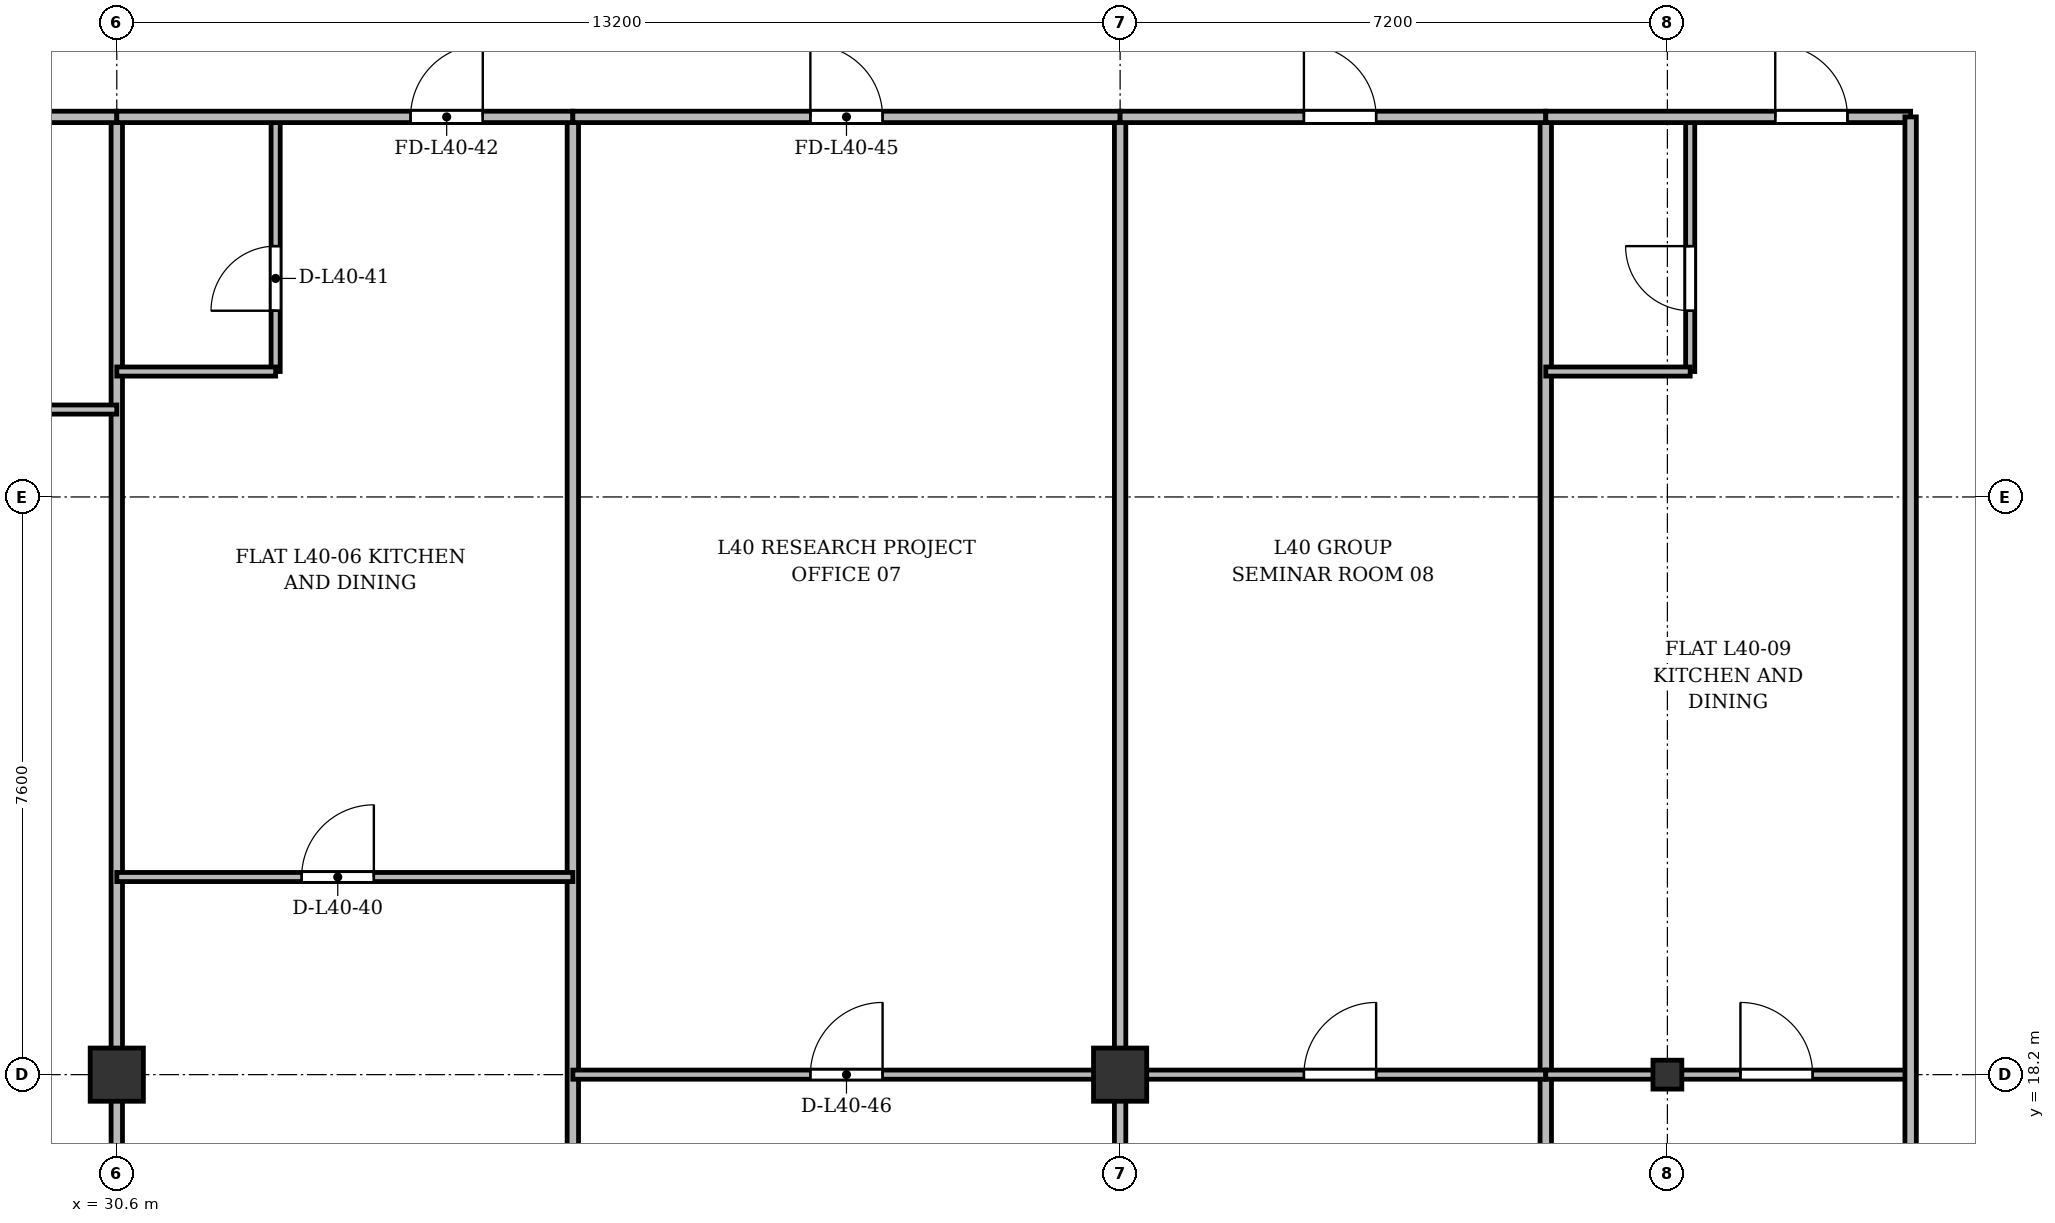
"""IFC4 building model, lengths in metres.
Left out: names, types, materials, properties, quantities, classifications, styles, units other than length and angle.
Written with IfcOpenShell. Run it as: python <this file> out.ifc"""

import sys

from ifc_helpers import new_model, si_unit, direction, frame, frame_2d, origin, origin_2d, place, context, subcontext, project, spatial, rectangle, i_section, extrude, source, transform, mapped, element, fill, save


model = new_model("IFC4")
c1 = context("Model", 3, precision=1e-05, world=origin(), true_north=direction((0.0, 1.0)))
c2 = subcontext(c1, "Body", "Model", "MODEL_VIEW")
j1 = project(units=[si_unit("LENGTHUNIT", "METRE"), si_unit("PLANEANGLEUNIT", "RADIAN")], contexts=[c1])
p1 = place(None, origin())
s1 = spatial("IfcSite", under=j1, at=p1, CompositionType="ELEMENT")
p2 = place(p1, origin())
s2 = spatial("IfcBuilding", under=s1, at=p2, CompositionType="ELEMENT")
p3 = place(p2, frame((0.0, 0.0, 153.7)))
s3 = spatial("IfcBuildingStorey", under=s2, at=p3, CompositionType="ELEMENT", Elevation=153.7)
m1 = source(origin(), c2, "Body", "SweptSolid", [
    extrude(rectangle(XDim=0.7, YDim=0.7, at=origin_2d()), origin(), (0.0, 0.0, 1.0), 3.6),
])
for number, where, z_axis, x_axis in (
    (1, (30.6, 18.2, 0.0), (0.0, 0.0, 1.0), (1.0, 0.0, 0.0)),
    (2, (43.8, 18.2, 0.0), (0.0, 0.0, 1.0), (1.0, 0.0, 0.0)),
):
    element("IfcColumn", number, at=place(p3, frame(where, z_axis=z_axis, x_axis=x_axis)), inside=s3, PredefinedType="COLUMN", context=c2, shape_type="MappedRepresentation", body=[
        mapped(m1, transform((0.0, 0.0, 0.0), x_axis=(1.0, 0.0, 0.0), y_axis=(0.0, 1.0, 0.0), z_axis=(0.0, 0.0, 1.0), scale=1.0)),
    ])
m2 = source(origin(), c2, "Body", "SweptSolid", [
    extrude(i_section(OverallWidth=0.38, OverallDepth=0.38, WebThickness=0.02, FlangeThickness=0.03, at=origin_2d()), origin(), (0.0, 0.0, 1.0), 3.6),
])
p4 = place(p3, frame((51.0, 18.2, 0.0), z_axis=(0.0, 0.0, 1.0), x_axis=(1.0, 0.0, 0.0)))
e3 = element("IfcColumn", 3, at=p4, inside=s3, PredefinedType="COLUMN", context=c2, shape_type="MappedRepresentation", body=[
    mapped(m2, transform((0.0, 0.0, 0.0), x_axis=(1.0, 0.0, 0.0), y_axis=(0.0, 1.0, 0.0), z_axis=(0.0, 0.0, 1.0), scale=1.0)),
])
p5 = place(p3, frame((30.6, 3.525, 0.0), z_axis=(0.0, 0.0, 1.0), x_axis=(0.0, 1.0, 0.0)))
e4 = element("IfcWall", 4, at=p5, inside=s3, PredefinedType="PARTITIONING", context=c2, shape_type="SweptSolid", body=[
    extrude(rectangle(XDim=27.275, YDim=0.15, at=frame_2d((13.638, 0.0))), origin(), (0.0, 0.0, 1.0), 2.85),
])
p6 = place(p3, frame((36.6, 3.525, 0.0), z_axis=(0.0, 0.0, 1.0), x_axis=(0.0, 1.0, 0.0)))
e5 = element("IfcWall", 5, at=p6, inside=s3, PredefinedType="PARTITIONING", context=c2, shape_type="SweptSolid", body=[
    extrude(rectangle(XDim=27.275, YDim=0.15, at=frame_2d((13.638, 0.0))), origin(), (0.0, 0.0, 1.0), 2.75),
])
p7 = place(p3, frame((43.8, 3.525, 0.0), z_axis=(0.0, 0.0, 1.0), x_axis=(0.0, 1.0, 0.0)))
e6 = element("IfcWall", 6, at=p7, inside=s3, PredefinedType="PARTITIONING", context=c2, shape_type="SweptSolid", body=[
    extrude(rectangle(XDim=27.275, YDim=0.15, at=frame_2d((13.638, 0.0))), origin(), (0.0, 0.0, 1.0), 2.85),
])
p8 = place(p3, frame((49.4, 3.525, 0.0), z_axis=(0.0, 0.0, 1.0), x_axis=(0.0, 1.0, 0.0)))
e7 = element("IfcWall", 7, at=p8, inside=s3, PredefinedType="PARTITIONING", context=c2, shape_type="SweptSolid", body=[
    extrude(rectangle(XDim=27.275, YDim=0.15, at=frame_2d((13.638, 0.0))), origin(), (0.0, 0.0, 1.0), 2.75),
])
p9 = place(p3, frame((26.2, 30.8, 0.0), z_axis=(0.0, 0.0, 1.0), x_axis=(1.0, 0.0, 0.0)))
e8 = element("IfcWall", 8, at=p9, inside=s3, PredefinedType="PARTITIONING", context=c2, shape_type="SweptSolid", body=[
    extrude(rectangle(XDim=4.4, YDim=0.15, at=frame_2d((2.2, 0.0))), origin(), (0.0, 0.0, 1.0), 2.85),
])
p10 = place(p9, frame((1.725, 0.0, 0.0)))
e9 = element("IfcOpeningElement", 9, at=p10, cuts=e8, PredefinedType="OPENING", context=c2, shape_type="SweptSolid", body=[
    extrude(rectangle(XDim=0.95, YDim=2.15, at=frame_2d((0.475, 1.075))), frame((0.0, 0.085, 0.0), z_axis=(0.0, -1.0, 0.0), x_axis=(1.0, 0.0, 0.0)), (0.0, 0.0, 1.0), 0.17),
])
p11 = place(p3, frame((26.2, 26.95, 0.0), z_axis=(0.0, 0.0, 1.0), x_axis=(1.0, 0.0, 0.0)))
e10 = element("IfcWall", 10, at=p11, inside=s3, PredefinedType="PARTITIONING", context=c2, shape_type="SweptSolid", body=[
    extrude(rectangle(XDim=4.4, YDim=0.12, at=frame_2d((2.2, 0.0))), origin(), (0.0, 0.0, 1.0), 2.85),
])
p12 = place(p11, frame((1.725, 0.0, 0.0)))
e11 = element("IfcOpeningElement", 11, at=p12, cuts=e10, PredefinedType="OPENING", context=c2, shape_type="SweptSolid", body=[
    extrude(rectangle(XDim=0.95, YDim=2.15, at=frame_2d((0.475, 1.075))), frame((0.0, 0.07, 0.0), z_axis=(0.0, -1.0, 0.0), x_axis=(1.0, 0.0, 0.0)), (0.0, 0.0, 1.0), 0.14),
])
p13 = place(p3, frame((30.6, 20.8, 0.0), z_axis=(0.0, 0.0, 1.0), x_axis=(1.0, 0.0, 0.0)))
e12 = element("IfcWall", 12, at=p13, inside=s3, PredefinedType="PARTITIONING", context=c2, shape_type="SweptSolid", body=[
    extrude(rectangle(XDim=6.0, YDim=0.12, at=frame_2d((3.0, 0.0))), origin(), (0.0, 0.0, 1.0), 2.85),
])
p14 = place(p13, frame((2.432, 0.0, 0.0)))
e13 = element("IfcOpeningElement", 13, at=p14, cuts=e12, PredefinedType="OPENING", context=c2, shape_type="SweptSolid", body=[
    extrude(rectangle(XDim=0.95, YDim=2.15, at=frame_2d((0.475, 1.075))), frame((0.0, 0.07, 0.0), z_axis=(0.0, -1.0, 0.0), x_axis=(1.0, 0.0, 0.0)), (0.0, 0.0, 1.0), 0.14),
])
p15 = place(p3, frame((32.69, 27.45, 0.0), z_axis=(0.0, 0.0, 1.0), x_axis=(0.0, 1.0, 0.0)))
e14 = element("IfcWall", 14, at=p15, inside=s3, PredefinedType="PARTITIONING", context=c2, shape_type="SweptSolid", body=[
    extrude(rectangle(XDim=3.35, YDim=0.12, at=frame_2d((1.675, 0.0))), origin(), (0.0, 0.0, 1.0), 3.35),
])
p16 = place(p15, frame((0.8, 0.0, 0.0)))
e15 = element("IfcOpeningElement", 15, at=p16, cuts=e14, PredefinedType="OPENING", context=c2, shape_type="SweptSolid", body=[
    extrude(rectangle(XDim=0.85, YDim=2.1, at=frame_2d((0.425, 1.05))), frame((0.0, 0.07, 0.0), z_axis=(0.0, -1.0, 0.0), x_axis=(1.0, 0.0, 0.0)), (0.0, 0.0, 1.0), 0.14),
])
p17 = place(p3, frame((30.6, 27.45, 0.0), z_axis=(0.0, 0.0, 1.0), x_axis=(1.0, 0.0, 0.0)))
e16 = element("IfcWall", 16, at=p17, inside=s3, PredefinedType="PARTITIONING", context=c2, shape_type="SweptSolid", body=[
    extrude(rectangle(XDim=2.09, YDim=0.12, at=frame_2d((1.045, 0.0))), origin(), (0.0, 0.0, 1.0), 2.85),
])
p18 = place(p3, frame((30.6, 30.8, 0.0), z_axis=(0.0, 0.0, 1.0), x_axis=(1.0, 0.0, 0.0)))
e17 = element("IfcWall", 17, at=p18, inside=s3, PredefinedType="PARTITIONING", context=c2, shape_type="SweptSolid", body=[
    extrude(rectangle(XDim=6.0, YDim=0.15, at=frame_2d((3.0, 0.0))), origin(), (0.0, 0.0, 1.0), 2.85),
])
p19 = place(p18, frame((3.865, 0.0, 0.0)))
e18 = element("IfcOpeningElement", 18, at=p19, cuts=e17, PredefinedType="OPENING", context=c2, shape_type="SweptSolid", body=[
    extrude(rectangle(XDim=0.95, YDim=2.15, at=frame_2d((0.475, 1.075))), frame((0.0, 0.085, 0.0), z_axis=(0.0, -1.0, 0.0), x_axis=(1.0, 0.0, 0.0)), (0.0, 0.0, 1.0), 0.17),
])
p20 = place(p3, frame((36.6, 30.8, 0.0), z_axis=(0.0, 0.0, 1.0), x_axis=(1.0, 0.0, 0.0)))
e19 = element("IfcWall", 19, at=p20, inside=s3, PredefinedType="PARTITIONING", context=c2, shape_type="SweptSolid", body=[
    extrude(rectangle(XDim=7.2, YDim=0.15, at=frame_2d((3.6, 0.0))), origin(), (0.0, 0.0, 1.0), 2.85),
])
p21 = place(p20, frame((3.125, 0.0, 0.0)))
e20 = element("IfcOpeningElement", 20, at=p21, cuts=e19, PredefinedType="OPENING", context=c2, shape_type="SweptSolid", body=[
    extrude(rectangle(XDim=0.95, YDim=2.15, at=frame_2d((0.475, 1.075))), frame((0.0, 0.085, 0.0), z_axis=(0.0, -1.0, 0.0), x_axis=(1.0, 0.0, 0.0)), (0.0, 0.0, 1.0), 0.17),
])
p22 = place(p3, frame((36.6, 18.2, 0.0), z_axis=(0.0, 0.0, 1.0), x_axis=(1.0, 0.0, 0.0)))
e21 = element("IfcWall", 21, at=p22, inside=s3, PredefinedType="PARTITIONING", context=c2, shape_type="SweptSolid", body=[
    extrude(rectangle(XDim=7.2, YDim=0.12, at=frame_2d((3.6, 0.0))), origin(), (0.0, 0.0, 1.0), 2.75),
])
p23 = place(p22, frame((3.125, 0.0, 0.0)))
e22 = element("IfcOpeningElement", 22, at=p23, cuts=e21, PredefinedType="OPENING", context=c2, shape_type="SweptSolid", body=[
    extrude(rectangle(XDim=0.95, YDim=2.15, at=frame_2d((0.475, 1.075))), frame((0.0, 0.07, 0.0), z_axis=(0.0, -1.0, 0.0), x_axis=(1.0, 0.0, 0.0)), (0.0, 0.0, 1.0), 0.14),
])
p24 = place(p3, frame((43.8, 30.8, 0.0), z_axis=(0.0, 0.0, 1.0), x_axis=(1.0, 0.0, 0.0)))
e23 = element("IfcWall", 23, at=p24, inside=s3, PredefinedType="PARTITIONING", context=c2, shape_type="SweptSolid", body=[
    extrude(rectangle(XDim=5.6, YDim=0.15, at=frame_2d((2.8, 0.0))), origin(), (0.0, 0.0, 1.0), 2.85),
])
p25 = place(p24, frame((2.418, 0.0, 0.0)))
e24 = element("IfcOpeningElement", 24, at=p25, cuts=e23, PredefinedType="OPENING", context=c2, shape_type="SweptSolid", body=[
    extrude(rectangle(XDim=0.95, YDim=2.15, at=frame_2d((0.475, 1.075))), frame((0.0, 0.085, 0.0), z_axis=(0.0, -1.0, 0.0), x_axis=(1.0, 0.0, 0.0)), (0.0, 0.0, 1.0), 0.17),
])
p26 = place(p3, frame((43.8, 18.2, 0.0), z_axis=(0.0, 0.0, 1.0), x_axis=(1.0, 0.0, 0.0)))
e25 = element("IfcWall", 25, at=p26, inside=s3, PredefinedType="PARTITIONING", context=c2, shape_type="SweptSolid", body=[
    extrude(rectangle(XDim=5.6, YDim=0.12, at=frame_2d((2.8, 0.0))), origin(), (0.0, 0.0, 1.0), 2.75),
])
p27 = place(p26, frame((2.418, 0.0, 0.0)))
e26 = element("IfcOpeningElement", 26, at=p27, cuts=e25, PredefinedType="OPENING", context=c2, shape_type="SweptSolid", body=[
    extrude(rectangle(XDim=0.95, YDim=2.15, at=frame_2d((0.475, 1.075))), frame((0.0, 0.07, 0.0), z_axis=(0.0, -1.0, 0.0), x_axis=(1.0, 0.0, 0.0)), (0.0, 0.0, 1.0), 0.14),
])
p28 = place(p3, frame((49.4, 18.2, 0.0), z_axis=(0.0, 0.0, 1.0), x_axis=(1.0, 0.0, 0.0)))
e27 = element("IfcWall", 27, at=p28, inside=s3, PredefinedType="PARTITIONING", context=c2, shape_type="SweptSolid", body=[
    extrude(rectangle(XDim=4.8, YDim=0.12, at=frame_2d((2.4, 0.0))), origin(), (0.0, 0.0, 1.0), 2.75),
])
p29 = place(p28, frame((2.561, 0.0, 0.0)))
e28 = element("IfcOpeningElement", 28, at=p29, cuts=e27, PredefinedType="OPENING", context=c2, shape_type="SweptSolid", body=[
    extrude(rectangle(XDim=0.95, YDim=2.15, at=frame_2d((0.475, 1.075))), frame((0.0, 0.07, 0.0), z_axis=(0.0, -1.0, 0.0), x_axis=(1.0, 0.0, 0.0)), (0.0, 0.0, 1.0), 0.14),
])
p30 = place(p3, frame((51.3, 27.45, 0.0), z_axis=(0.0, 0.0, 1.0), x_axis=(0.0, 1.0, 0.0)))
e29 = element("IfcWall", 29, at=p30, inside=s3, PredefinedType="PARTITIONING", context=c2, shape_type="SweptSolid", body=[
    extrude(rectangle(XDim=3.35, YDim=0.12, at=frame_2d((1.675, 0.0))), origin(), (0.0, 0.0, 1.0), 3.35),
])
p31 = place(p30, frame((0.8, 0.0, 0.0)))
e30 = element("IfcOpeningElement", 30, at=p31, cuts=e29, PredefinedType="OPENING", context=c2, shape_type="SweptSolid", body=[
    extrude(rectangle(XDim=0.85, YDim=2.1, at=frame_2d((0.425, 1.05))), frame((0.0, 0.07, 0.0), z_axis=(0.0, -1.0, 0.0), x_axis=(1.0, 0.0, 0.0)), (0.0, 0.0, 1.0), 0.14),
])
p32 = place(p3, frame((49.4, 27.45, 0.0), z_axis=(0.0, 0.0, 1.0), x_axis=(1.0, 0.0, 0.0)))
e31 = element("IfcWall", 31, at=p32, inside=s3, PredefinedType="PARTITIONING", context=c2, shape_type="SweptSolid", body=[
    extrude(rectangle(XDim=1.9, YDim=0.12, at=frame_2d((0.95, 0.0))), origin(), (0.0, 0.0, 1.0), 2.85),
])
p33 = place(p3, frame((49.4, 30.8, 0.0), z_axis=(0.0, 0.0, 1.0), x_axis=(1.0, 0.0, 0.0)))
e32 = element("IfcWall", 32, at=p33, inside=s3, PredefinedType="PARTITIONING", context=c2, shape_type="SweptSolid", body=[
    extrude(rectangle(XDim=4.8, YDim=0.15, at=frame_2d((2.4, 0.0))), origin(), (0.0, 0.0, 1.0), 2.85),
])
p34 = place(p33, frame((3.019, 0.0, 0.0)))
e33 = element("IfcOpeningElement", 33, at=p34, cuts=e32, PredefinedType="OPENING", context=c2, shape_type="SweptSolid", body=[
    extrude(rectangle(XDim=0.95, YDim=2.15, at=frame_2d((0.475, 1.075))), frame((0.0, 0.085, 0.0), z_axis=(0.0, -1.0, 0.0), x_axis=(1.0, 0.0, 0.0)), (0.0, 0.0, 1.0), 0.17),
])
p35 = place(p3, frame((54.2, 3.525, 0.0), z_axis=(0.0, 0.0, 1.0), x_axis=(0.0, 1.0, 0.0)))
e34 = element("IfcWall", 34, at=p35, inside=s3, PredefinedType="PARTITIONING", context=c2, shape_type="SweptSolid", body=[
    extrude(rectangle(XDim=27.275, YDim=0.15, at=frame_2d((13.638, 0.0))), origin(), (0.0, 0.0, 1.0), 2.75),
])
m3 = source(origin(), c2, "Body", "SweptSolid", [
    extrude(rectangle(XDim=0.95, YDim=2.15, at=frame_2d((0.475, 1.075))), frame((0.0, 0.025, 0.0), z_axis=(0.0, -1.0, 0.0), x_axis=(1.0, 0.0, 0.0)), (0.0, 0.0, 1.0), 0.05),
])
p36 = place(p14, origin())
e35 = element("IfcDoor", 35, at=p36, inside=s3, OperationType="SINGLE_SWING_RIGHT", PredefinedType="DOOR", context=c2, shape_type="MappedRepresentation", body=[
    mapped(m3, transform((0.0, 0.0, 0.0), x_axis=(1.0, 0.0, 0.0), y_axis=(0.0, 1.0, 0.0), z_axis=(0.0, 0.0, 1.0), scale=1.0)),
])
fill(e13, e35)
m4 = source(origin(), c2, "Body", "SweptSolid", [
    extrude(rectangle(XDim=0.85, YDim=2.1, at=frame_2d((0.425, 1.05))), frame((0.0, 0.025, 0.0), z_axis=(0.0, -1.0, 0.0), x_axis=(1.0, 0.0, 0.0)), (0.0, 0.0, 1.0), 0.05),
])
p37 = place(p16, origin())
e36 = element("IfcDoor", 36, at=p37, inside=s3, OperationType="SINGLE_SWING_LEFT", PredefinedType="DOOR", context=c2, shape_type="MappedRepresentation", body=[
    mapped(m4, transform((0.0, 0.0, 0.0), x_axis=(1.0, 0.0, 0.0), y_axis=(0.0, 1.0, 0.0), z_axis=(0.0, 0.0, 1.0), scale=1.0)),
])
fill(e15, e36)
p38 = place(p19, origin())
e37 = element("IfcDoor", 37, at=p38, inside=s3, OperationType="SINGLE_SWING_RIGHT", PredefinedType="DOOR", context=c2, shape_type="MappedRepresentation", body=[
    mapped(m3, transform((0.0, 0.0, 0.0), x_axis=(1.0, 0.0, 0.0), y_axis=(0.0, 1.0, 0.0), z_axis=(0.0, 0.0, 1.0), scale=1.0)),
])
fill(e18, e37)
p39 = place(p21, origin())
e38 = element("IfcDoor", 38, at=p39, inside=s3, OperationType="SINGLE_SWING_LEFT", PredefinedType="DOOR", context=c2, shape_type="MappedRepresentation", body=[
    mapped(m3, transform((0.0, 0.0, 0.0), x_axis=(1.0, 0.0, 0.0), y_axis=(0.0, 1.0, 0.0), z_axis=(0.0, 0.0, 1.0), scale=1.0)),
])
fill(e20, e38)
p40 = place(p23, origin())
e39 = element("IfcDoor", 39, at=p40, inside=s3, OperationType="SINGLE_SWING_RIGHT", PredefinedType="DOOR", context=c2, shape_type="MappedRepresentation", body=[
    mapped(m3, transform((0.0, 0.0, 0.0), x_axis=(1.0, 0.0, 0.0), y_axis=(0.0, 1.0, 0.0), z_axis=(0.0, 0.0, 1.0), scale=1.0)),
])
fill(e22, e39)
p41 = place(p25, origin())
e40 = element("IfcDoor", 40, at=p41, inside=s3, OperationType="SINGLE_SWING_LEFT", PredefinedType="DOOR", context=c2, shape_type="MappedRepresentation", body=[
    mapped(m3, transform((0.0, 0.0, 0.0), x_axis=(1.0, 0.0, 0.0), y_axis=(0.0, 1.0, 0.0), z_axis=(0.0, 0.0, 1.0), scale=1.0)),
])
fill(e24, e40)
p42 = place(p27, origin())
e41 = element("IfcDoor", 41, at=p42, inside=s3, OperationType="SINGLE_SWING_RIGHT", PredefinedType="DOOR", context=c2, shape_type="MappedRepresentation", body=[
    mapped(m3, transform((0.0, 0.0, 0.0), x_axis=(1.0, 0.0, 0.0), y_axis=(0.0, 1.0, 0.0), z_axis=(0.0, 0.0, 1.0), scale=1.0)),
])
fill(e26, e41)
p43 = place(p29, origin())
e42 = element("IfcDoor", 42, at=p43, inside=s3, OperationType="SINGLE_SWING_LEFT", PredefinedType="DOOR", context=c2, shape_type="MappedRepresentation", body=[
    mapped(m3, transform((0.0, 0.0, 0.0), x_axis=(1.0, 0.0, 0.0), y_axis=(0.0, 1.0, 0.0), z_axis=(0.0, 0.0, 1.0), scale=1.0)),
])
fill(e28, e42)
p44 = place(p31, origin())
e43 = element("IfcDoor", 43, at=p44, inside=s3, OperationType="SINGLE_SWING_RIGHT", PredefinedType="DOOR", context=c2, shape_type="MappedRepresentation", body=[
    mapped(m4, transform((0.0, 0.0, 0.0), x_axis=(1.0, 0.0, 0.0), y_axis=(0.0, 1.0, 0.0), z_axis=(0.0, 0.0, 1.0), scale=1.0)),
])
fill(e30, e43)
p45 = place(p34, origin())
e44 = element("IfcDoor", 44, at=p45, inside=s3, OperationType="SINGLE_SWING_LEFT", PredefinedType="DOOR", context=c2, shape_type="MappedRepresentation", body=[
    mapped(m3, transform((0.0, 0.0, 0.0), x_axis=(1.0, 0.0, 0.0), y_axis=(0.0, 1.0, 0.0), z_axis=(0.0, 0.0, 1.0), scale=1.0)),
])
fill(e33, e44)
save(model, sys.argv[1])
